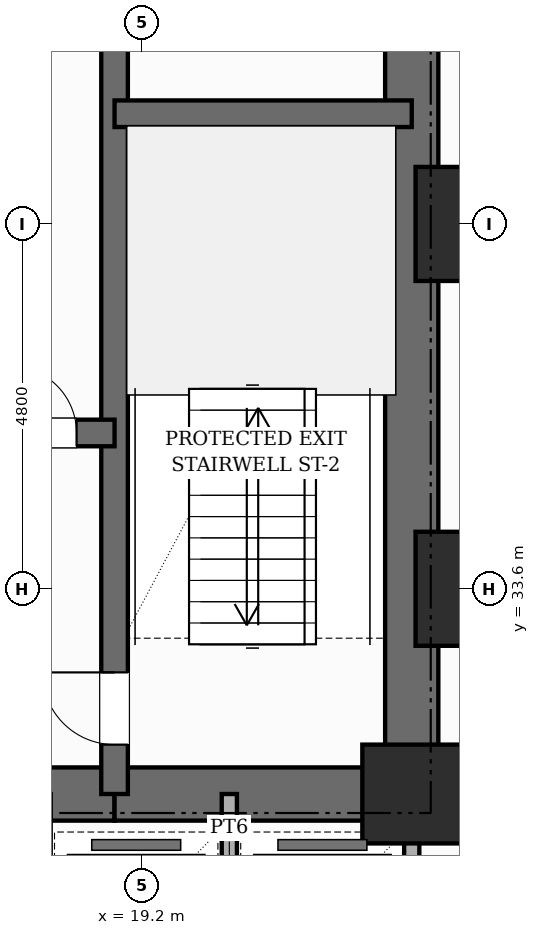
"""IFC4 building model, lengths in metres.
Left out: names, types, materials, properties, quantities, classifications, styles, units other than length and angle.
Written with IfcOpenShell. Run it as: python <this file> out.ifc"""

import sys

from ifc_helpers import new_model, si_unit, direction, frame, frame_2d, origin, origin_2d, place, context, subcontext, project, spatial, rectangle, extrude, element, fill, save


model = new_model("IFC4")
c1 = context("Model", 3, precision=1e-05, world=origin(), true_north=direction((0.0, 1.0)))
c2 = subcontext(c1, "Body", "Model", "MODEL_VIEW")
j1 = project(units=[si_unit("LENGTHUNIT", "METRE"), si_unit("PLANEANGLEUNIT", "RADIAN")], contexts=[c1])
p1 = place(None, origin())
s1 = spatial("IfcSite", under=j1, at=p1, CompositionType="ELEMENT")
p2 = place(p1, origin())
s2 = spatial("IfcBuilding", under=s1, at=p2, CompositionType="ELEMENT")
p3 = place(p2, frame((0.0, 0.0, -8.8)))
s3 = spatial("IfcBuildingStorey", under=s2, at=p3, CompositionType="ELEMENT", Elevation=-8.8)
p4 = place(p3, frame((22.75, 30.55, 0.0), z_axis=(0.0, 0.0, 1.0), x_axis=(0.0, 1.0, 0.0)))
e1 = element("IfcWall", 1, at=p4, inside=s3, PredefinedType="SHEAR", context=c2, shape_type="SweptSolid", body=[
    extrude(rectangle(XDim=15.6, YDim=0.7, at=frame_2d((7.8, 0.0))), origin(), (0.0, 0.0, 1.0), 4.4),
])
p5 = place(p4, frame((10.8, 0.0, 0.0)))
e2 = element("IfcOpeningElement", 2, at=p5, cuts=e1, PredefinedType="OPENING", context=c2, shape_type="SweptSolid", body=[
    extrude(rectangle(XDim=1.0, YDim=2.15, at=frame_2d((0.5, 1.075))), frame((0.0, 0.36, 0.0), z_axis=(0.0, -1.0, 0.0), x_axis=(1.0, 0.0, 0.0)), (0.0, 0.0, 1.0), 0.72),
])
p6 = place(p3, frame((9.96, 30.9, 0.0), z_axis=(0.0, 0.0, 1.0), x_axis=(1.0, 0.0, 0.0)))
e3 = element("IfcWall", 3, at=p6, inside=s3, PredefinedType="SHEAR", context=c2, shape_type="SweptSolid", body=[
    extrude(rectangle(XDim=8.88, YDim=0.7, at=frame_2d((4.44, 0.0))), origin(), (0.0, 0.0, 1.0), 4.4),
])
p7 = place(p6, frame((4.09, 0.0, 0.0)))
e4 = element("IfcOpeningElement", 4, at=p7, cuts=e3, PredefinedType="OPENING", context=c2, shape_type="SweptSolid", body=[
    extrude(rectangle(XDim=1.0, YDim=2.15, at=frame_2d((0.5, 1.075))), frame((0.0, 0.36, 0.0), z_axis=(0.0, -1.0, 0.0), x_axis=(1.0, 0.0, 0.0)), (0.0, 0.0, 1.0), 0.72),
])
p8 = place(p3, frame((18.84, 30.9, 0.0), z_axis=(0.0, 0.0, 1.0), x_axis=(1.0, 0.0, 0.0)))
e5 = element("IfcWall", 5, at=p8, inside=s3, PredefinedType="SHEAR", context=c2, shape_type="SweptSolid", body=[
    extrude(rectangle(XDim=3.91, YDim=0.7, at=frame_2d((1.955, 0.0))), origin(), (0.0, 0.0, 1.0), 4.4),
])
p9 = place(p3, frame((18.84, 30.9, 0.0), z_axis=(0.0, 0.0, 1.0), x_axis=(0.0, 1.0, 0.0)))
e6 = element("IfcWall", 6, at=p9, inside=s3, PredefinedType="SHEAR", context=c2, shape_type="SweptSolid", body=[
    extrude(rectangle(XDim=14.9, YDim=0.35, at=frame_2d((7.45, 0.0))), origin(), (0.0, 0.0, 1.0), 4.4),
])
p10 = place(p9, frame((0.65, 0.0, 0.0)))
e7 = element("IfcOpeningElement", 7, at=p10, cuts=e6, PredefinedType="OPENING", context=c2, shape_type="SweptSolid", body=[
    extrude(rectangle(XDim=0.95, YDim=2.1, at=frame_2d((0.475, 1.05))), frame((0.0, 0.185, 0.0), z_axis=(0.0, -1.0, 0.0), x_axis=(1.0, 0.0, 0.0)), (0.0, 0.0, 1.0), 0.37),
])
p11 = place(p9, frame((10.45, 0.0, 0.0)))
e8 = element("IfcOpeningElement", 8, at=p11, cuts=e6, PredefinedType="OPENING", context=c2, shape_type="SweptSolid", body=[
    extrude(rectangle(XDim=1.0, YDim=2.15, at=frame_2d((0.5, 1.075))), frame((0.0, 0.185, 0.0), z_axis=(0.0, -1.0, 0.0), x_axis=(1.0, 0.0, 0.0)), (0.0, 0.0, 1.0), 0.37),
])
p12 = place(p3, frame((18.84, 39.85, 0.0), z_axis=(0.0, 0.0, 1.0), x_axis=(1.0, 0.0, 0.0)))
e9 = element("IfcWall", 9, at=p12, inside=s3, PredefinedType="SHEAR", context=c2, shape_type="SweptSolid", body=[
    extrude(rectangle(XDim=3.91, YDim=0.35, at=frame_2d((1.955, 0.0))), origin(), (0.0, 0.0, 1.0), 4.4),
])
p13 = place(p3, frame((9.96, 35.65, 0.0), z_axis=(0.0, 0.0, 1.0), x_axis=(1.0, 0.0, 0.0)))
e10 = element("IfcWall", 10, at=p13, inside=s3, PredefinedType="SHEAR", context=c2, shape_type="SweptSolid", body=[
    extrude(rectangle(XDim=8.88, YDim=0.35, at=frame_2d((4.44, 0.0))), origin(), (0.0, 0.0, 1.0), 4.4),
])
p14 = place(p13, frame((0.84, 0.0, 0.0)))
e11 = element("IfcOpeningElement", 11, at=p14, cuts=e10, PredefinedType="OPENING", context=c2, shape_type="SweptSolid", body=[
    extrude(rectangle(XDim=1.1, YDim=2.15, at=frame_2d((0.55, 1.075))), frame((0.0, 0.185, 0.0), z_axis=(0.0, -1.0, 0.0), x_axis=(1.0, 0.0, 0.0)), (0.0, 0.0, 1.0), 0.37),
])
p15 = place(p13, frame((5.24, 0.0, 0.0)))
e12 = element("IfcOpeningElement", 12, at=p15, cuts=e10, PredefinedType="OPENING", context=c2, shape_type="SweptSolid", body=[
    extrude(rectangle(XDim=1.1, YDim=2.15, at=frame_2d((0.55, 1.075))), frame((0.0, 0.185, 0.0), z_axis=(0.0, -1.0, 0.0), x_axis=(1.0, 0.0, 0.0)), (0.0, 0.0, 1.0), 0.37),
])
p16 = place(p13, frame((7.5, 0.0, 0.0)))
e13 = element("IfcOpeningElement", 13, at=p16, cuts=e10, PredefinedType="OPENING", context=c2, shape_type="SweptSolid", body=[
    extrude(rectangle(XDim=0.88, YDim=2.1, at=frame_2d((0.44, 1.05))), frame((0.0, 0.185, 0.0), z_axis=(0.0, -1.0, 0.0), x_axis=(1.0, 0.0, 0.0)), (0.0, 0.0, 1.0), 0.37),
])
p17 = place(p3, frame((22.75, 30.9, 0.0), z_axis=(0.0, 0.0, 1.0), x_axis=(1.0, 0.0, 0.0)))
e14 = element("IfcColumn", 14, at=p17, inside=s3, PredefinedType="COLUMN", context=c2, shape_type="SweptSolid", body=[
    extrude(rectangle(XDim=1.3, YDim=1.3, at=origin_2d()), origin(), (0.0, 0.0, 1.0), 4.4),
])
for number, where, z_axis, x_axis in (
    (15, (23.55, 33.6, 0.0), (0.0, 0.0, 1.0), (1.0, 0.0, 0.0)),
    (16, (23.55, 38.4, 0.0), (0.0, 0.0, 1.0), (1.0, 0.0, 0.0)),
):
    element("IfcColumn", number, at=place(p3, frame(where, z_axis=z_axis, x_axis=x_axis)), inside=s3, PredefinedType="USERDEFINED", context=c2, shape_type="SweptSolid", body=[
        extrude(rectangle(XDim=1.5, YDim=1.5, at=origin_2d()), origin(), (0.0, 0.0, 1.0), 4.4),
    ])
p18 = place(p3, frame((22.75, 27.9, 0.0), z_axis=(0.0, 0.0, 1.0), x_axis=(0.0, 1.0, 0.0)))
e17 = element("IfcWall", 17, at=p18, inside=s3, PredefinedType="POLYGONAL", context=c2, shape_type="SweptSolid", body=[
    extrude(rectangle(XDim=3.0, YDim=0.2, at=frame_2d((1.5, 0.0))), origin(), (0.0, 0.0, 1.0), 4.08),
])
p19 = place(p3, frame((20.35, 28.0, 0.0), z_axis=(0.0, 0.0, 1.0), x_axis=(0.0, 1.0, 0.0)))
e18 = element("IfcWall", 18, at=p19, inside=s3, PredefinedType="POLYGONAL", context=c2, shape_type="SweptSolid", body=[
    extrude(rectangle(XDim=2.9, YDim=0.2, at=frame_2d((1.45, 0.0))), origin(), (0.0, 0.0, 1.0), 4.08),
])
p20 = place(p10, origin())
e19 = element("IfcDoor", 19, at=p20, inside=s3, OperationType="SINGLE_SWING_RIGHT", PredefinedType="DOOR", context=c2, shape_type="SweptSolid", body=[
    extrude(rectangle(XDim=0.95, YDim=2.1, at=frame_2d((0.475, 1.05))), frame((0.0, 0.025, 0.0), z_axis=(0.0, -1.0, 0.0), x_axis=(1.0, 0.0, 0.0)), (0.0, 0.0, 1.0), 0.05),
])
fill(e7, e19)
p21 = place(p16, origin())
e20 = element("IfcDoor", 20, at=p21, inside=s3, OperationType="SINGLE_SWING_LEFT", PredefinedType="DOOR", context=c2, shape_type="SweptSolid", body=[
    extrude(rectangle(XDim=0.88, YDim=2.1, at=frame_2d((0.44, 1.05))), frame((0.0, 0.025, 0.0), z_axis=(0.0, -1.0, 0.0), x_axis=(1.0, 0.0, 0.0)), (0.0, 0.0, 1.0), 0.05),
])
fill(e13, e20)
save(model, sys.argv[1])
